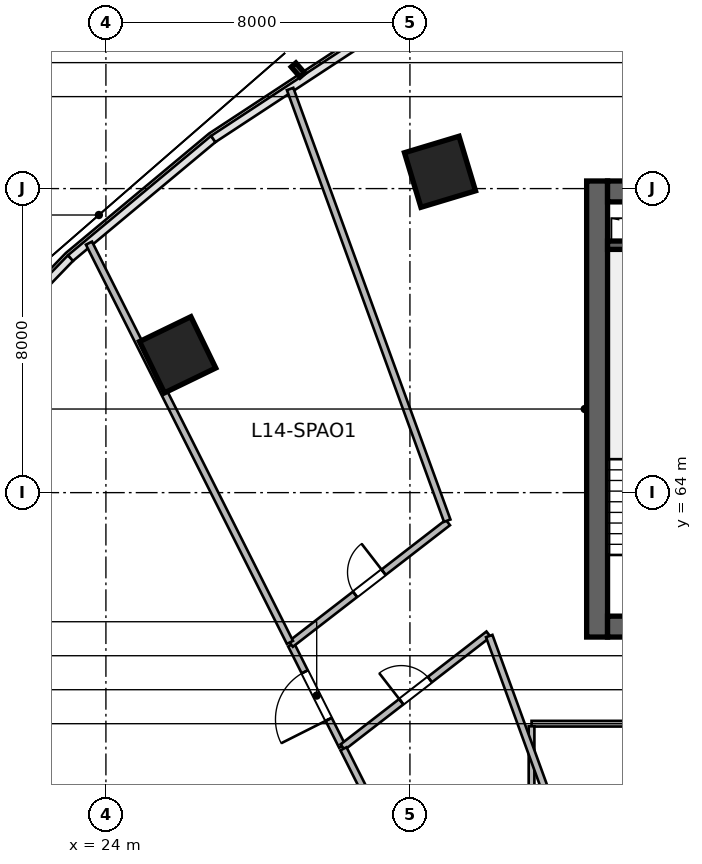
"""IFC4 building model, lengths in metres.
Left out: names, types, materials, properties, quantities, classifications, styles, units other than length and angle.
Written with IfcOpenShell. Run it as: python <this file> out.ifc"""

import sys

from ifc_helpers import new_model, si_unit, direction, frame, frame_2d, origin, origin_2d, place, context, subcontext, project, spatial, rectangle, extrude, source, transform, mapped, element, fill, save


model = new_model("IFC4")
c1 = context("Model", 3, precision=1e-05, world=origin(), true_north=direction((0.0, 1.0)))
c2 = subcontext(c1, "Body", "Model", "MODEL_VIEW")
j1 = project(units=[si_unit("LENGTHUNIT", "METRE"), si_unit("PLANEANGLEUNIT", "RADIAN")], contexts=[c1])
p1 = place(None, origin())
s1 = spatial("IfcSite", under=j1, at=p1, CompositionType="ELEMENT")
p2 = place(p1, origin())
s2 = spatial("IfcBuilding", under=s1, at=p2, CompositionType="ELEMENT")
p3 = place(p2, frame((0.0, 0.0, 64.2)))
s3 = spatial("IfcBuildingStorey", under=s2, at=p3, CompositionType="ELEMENT", Elevation=64.2)
m1 = source(origin(), c2, "Body", "SweptSolid", [
    extrude(rectangle(XDim=12.0, YDim=0.55, at=frame_2d((6.0, 0.0))), origin(), (0.0, 0.0, 1.0), 3.6),
])
p4 = place(p3, frame((36.925, 60.2, 0.0), z_axis=(0.0, 0.0, 1.0), x_axis=(0.0, 1.0, 0.0)))
e1 = element("IfcWall", 1, at=p4, inside=s3, PredefinedType="SHEAR", context=c2, shape_type="MappedRepresentation", body=[
    mapped(m1, transform((0.0, 0.0, 0.0), scale=1.0)),
])
m2 = source(origin(), c2, "Body", "SweptSolid", [
    extrude(rectangle(XDim=21.6, YDim=0.55, at=frame_2d((10.8, 0.0))), origin(), (0.0, 0.0, 1.0), 3.6),
])
p5 = place(p3, frame((37.2, 60.475, 0.0), z_axis=(0.0, 0.0, 1.0), x_axis=(1.0, 0.0, 0.0)))
e2 = element("IfcWall", 2, at=p5, inside=s3, PredefinedType="SHEAR", context=c2, shape_type="MappedRepresentation", body=[
    mapped(m2, transform((0.0, 0.0, 0.0), scale=1.0)),
])
p6 = place(p5, frame((1.1, 0.0, 0.0)))
e3 = element("IfcOpeningElement", 3, at=p6, cuts=e2, PredefinedType="OPENING", context=c2, shape_type="SweptSolid", body=[
    extrude(rectangle(XDim=1.15, YDim=2.15, at=frame_2d((0.575, 1.075))), frame((0.0, 0.285, 0.0), z_axis=(0.0, -1.0, 0.0), x_axis=(1.0, 0.0, 0.0)), (0.0, 0.0, 1.0), 0.57),
])
p7 = place(p5, frame((19.5, 0.0, 0.0)))
e4 = element("IfcOpeningElement", 4, at=p7, cuts=e2, PredefinedType="OPENING", context=c2, shape_type="SweptSolid", body=[
    extrude(rectangle(XDim=0.9, YDim=2.1, at=frame_2d((0.45, 1.05))), frame((0.0, 0.285, 0.0), z_axis=(0.0, -1.0, 0.0), x_axis=(1.0, 0.0, 0.0)), (0.0, 0.0, 1.0), 0.57),
])
p8 = place(p5, frame((12.02, 0.0, 0.0)))
e5 = element("IfcOpeningElement", 5, at=p8, cuts=e2, PredefinedType="OPENING", context=c2, shape_type="SweptSolid", body=[
    extrude(rectangle(XDim=1.6, YDim=2.15, at=frame_2d((0.8, 1.075))), frame((0.0, 0.285, 0.0), z_axis=(0.0, -1.0, 0.0), x_axis=(1.0, 0.0, 0.0)), (0.0, 0.0, 1.0), 0.57),
])
p9 = place(p3, frame((37.2, 71.925, 0.0), z_axis=(0.0, 0.0, 1.0), x_axis=(1.0, 0.0, 0.0)))
e6 = element("IfcWall", 6, at=p9, inside=s3, PredefinedType="SHEAR", context=c2, shape_type="MappedRepresentation", body=[
    mapped(m2, transform((0.0, 0.0, 0.0), scale=1.0)),
])
p10 = place(p9, frame((1.2, 0.0, 0.0)))
e7 = element("IfcOpeningElement", 7, at=p10, cuts=e6, PredefinedType="OPENING", context=c2, shape_type="SweptSolid", body=[
    extrude(rectangle(XDim=0.9, YDim=2.1, at=frame_2d((0.45, 1.05))), frame((0.0, 0.285, 0.0), z_axis=(0.0, -1.0, 0.0), x_axis=(1.0, 0.0, 0.0)), (0.0, 0.0, 1.0), 0.57),
])
p11 = place(p9, frame((14.7, 0.0, 0.0)))
e8 = element("IfcOpeningElement", 8, at=p11, cuts=e6, PredefinedType="OPENING", context=c2, shape_type="SweptSolid", body=[
    extrude(rectangle(XDim=1.2, YDim=2.15, at=frame_2d((0.6, 1.075))), frame((0.0, 0.285, 0.0), z_axis=(0.0, -1.0, 0.0), x_axis=(1.0, 0.0, 0.0)), (0.0, 0.0, 1.0), 0.57),
])
p12 = place(p9, frame((4.15, 0.0, 0.0)))
e9 = element("IfcOpeningElement", 9, at=p12, cuts=e6, PredefinedType="OPENING", context=c2, shape_type="SweptSolid", body=[
    extrude(rectangle(XDim=1.3, YDim=2.15, at=frame_2d((0.65, 1.075))), frame((0.0, 0.285, 0.0), z_axis=(0.0, -1.0, 0.0), x_axis=(1.0, 0.0, 0.0)), (0.0, 0.0, 1.0), 0.57),
])
p13 = place(p9, frame((7.1, 0.0, 0.0)))
e10 = element("IfcOpeningElement", 10, at=p13, cuts=e6, PredefinedType="OPENING", context=c2, shape_type="SweptSolid", body=[
    extrude(rectangle(XDim=0.9, YDim=2.1, at=frame_2d((0.45, 1.05))), frame((0.0, 0.285, 0.0), z_axis=(0.0, -1.0, 0.0), x_axis=(1.0, 0.0, 0.0)), (0.0, 0.0, 1.0), 0.57),
])
m3 = source(origin(), c2, "Body", "SweptSolid", [
    extrude(rectangle(XDim=3.27, YDim=0.22, at=frame_2d((1.635, 0.0))), origin(), (0.0, 0.0, 1.0), 3.6),
])
p14 = place(p3, frame((37.2, 70.51, 0.0), z_axis=(0.0, 0.0, 1.0), x_axis=(1.0, 0.0, 0.0)))
e11 = element("IfcWall", 11, at=p14, inside=s3, PredefinedType="SHEAR", context=c2, shape_type="MappedRepresentation", body=[
    mapped(m3, transform((0.0, 0.0, 0.0), scale=1.0)),
])
m4 = source(origin(), c2, "Body", "SweptSolid", [
    extrude(rectangle(XDim=1.5, YDim=1.5, at=origin_2d()), origin(), (0.0, 0.0, 1.0), 3.6),
])
for number, where, z_axis, x_axis in (
    (12, (25.888, 67.627, 0.0), (0.0, 0.0, 1.0), (-0.436, 0.9, 0.0)),
    (13, (32.791, 72.442, 0.0), (0.0, 0.0, 1.0), (-0.289, 0.957, 0.0)),
):
    element("IfcColumn", number, at=place(p3, frame(where, z_axis=z_axis, x_axis=x_axis)), inside=s3, PredefinedType="COLUMN", context=c2, shape_type="MappedRepresentation", body=[
        mapped(m4, transform((0.0, 0.0, 0.0), scale=1.0)),
    ])
m5 = source(origin(), c2, "Body", "SweptSolid", [
    extrude(rectangle(XDim=6.6, YDim=0.15, at=frame_2d((3.3, 0.0))), origin(), (0.0, 0.0, 1.0), 3.36),
])
p15 = place(p3, frame((35.2, 57.92, 0.0), z_axis=(0.0, 0.0, 1.0), x_axis=(1.0, 0.0, 0.0)))
e14 = element("IfcWall", 14, at=p15, inside=s3, PredefinedType="PARTITIONING", context=c2, shape_type="MappedRepresentation", body=[
    mapped(m5, transform((0.0, 0.0, 0.0), scale=1.0)),
])
p16 = place(p15, frame((2.85, 0.0, 0.0)))
e15 = element("IfcOpeningElement", 15, at=p16, cuts=e14, PredefinedType="OPENING", context=c2, shape_type="SweptSolid", body=[
    extrude(rectangle(XDim=0.9, YDim=2.1, at=frame_2d((0.45, 1.05))), frame((0.0, 0.085, 0.0), z_axis=(0.0, -1.0, 0.0), x_axis=(1.0, 0.0, 0.0)), (0.0, 0.0, 1.0), 0.17),
])
m6 = source(origin(), c2, "Body", "SweptSolid", [
    extrude(rectangle(XDim=3.785, YDim=0.15, at=frame_2d((1.893, 0.0))), origin(), (0.0, 0.0, 1.0), 3.36),
])
p17 = place(p3, frame((35.2, 54.067, 0.0), z_axis=(0.0, 0.0, 1.0), x_axis=(0.0, 1.0, 0.0)))
e16 = element("IfcWall", 16, at=p17, inside=s3, PredefinedType="PARTITIONING", context=c2, shape_type="MappedRepresentation", body=[
    mapped(m6, transform((0.0, 0.0, 0.0), scale=1.0)),
])
m7 = source(origin(), c2, "Body", "SweptSolid", [
    extrude(rectangle(XDim=2.985, YDim=0.18, at=frame_2d((1.493, 0.0))), origin(), (0.0, 0.0, 1.0), 3.36),
])
p18 = place(p3, frame((30.218, 57.327, 0.0), z_axis=(0.0, 0.0, 1.0), x_axis=(-0.449665526069, 0.893197018952, 0.0)))
e17 = element("IfcWall", 17, at=p18, inside=s3, PredefinedType="PLUMBINGWALL", context=c2, shape_type="MappedRepresentation", body=[
    mapped(m7, transform((0.0, 0.0, 0.0), scale=1.0)),
])
p19 = place(p18, frame((0.792, 0.0, 0.0)))
e18 = element("IfcOpeningElement", 18, at=p19, cuts=e17, PredefinedType="OPENING", context=c2, shape_type="SweptSolid", body=[
    extrude(rectangle(XDim=1.4, YDim=2.15, at=frame_2d((0.7, 1.075))), frame((0.0, 0.1, 0.0), z_axis=(0.0, -1.0, 0.0), x_axis=(1.0, 0.0, 0.0)), (0.0, 0.0, 1.0), 0.2),
])
m8 = source(origin(), c2, "Body", "SweptSolid", [
    extrude(rectangle(XDim=5.227, YDim=0.18, at=frame_2d((2.614, 0.0))), origin(), (0.0, 0.0, 1.0), 3.36),
])
p20 = place(p3, frame((28.865, 60.015, 0.0), z_axis=(0.0, 0.0, 1.0), x_axis=(0.790908912792, 0.61193389485, 0.0)))
e19 = element("IfcWall", 19, at=p20, inside=s3, PredefinedType="PLUMBINGWALL", context=c2, shape_type="MappedRepresentation", body=[
    mapped(m8, transform((0.0, 0.0, 0.0), scale=1.0)),
])
p21 = place(p20, frame((2.139, 0.0, 0.0)))
e20 = element("IfcOpeningElement", 20, at=p21, cuts=e19, PredefinedType="OPENING", context=c2, shape_type="SweptSolid", body=[
    extrude(rectangle(XDim=0.95, YDim=2.1, at=frame_2d((0.475, 1.05))), frame((0.0, 0.1, 0.0), z_axis=(0.0, -1.0, 0.0), x_axis=(1.0, 0.0, 0.0)), (0.0, 0.0, 1.0), 0.2),
])
m9 = source(origin(), c2, "Body", "SweptSolid", [
    extrude(rectangle(XDim=11.761, YDim=0.18, at=frame_2d((5.88, 0.0))), origin(), (0.0, 0.0, 1.0), 3.36),
])
p22 = place(p3, frame((28.842, 60.06, 0.0), z_axis=(0.0, 0.0, 1.0), x_axis=(-0.449611686329, 0.893224121661, 0.0)))
e21 = element("IfcWall", 21, at=p22, inside=s3, PredefinedType="PLUMBINGWALL", context=c2, shape_type="MappedRepresentation", body=[
    mapped(m9, transform((0.0, 0.0, 0.0), scale=1.0)),
])
m10 = source(origin(), c2, "Body", "SweptSolid", [
    extrude(rectangle(XDim=12.088, YDim=0.18, at=frame_2d((6.044, 0.0))), origin(), (0.0, 0.0, 1.0), 3.36),
])
p23 = place(p3, frame((32.981, 63.262, 0.0), z_axis=(0.0, 0.0, 1.0), x_axis=(-0.34203007529, 0.939689005787, 0.0)))
e22 = element("IfcWall", 22, at=p23, inside=s3, PredefinedType="PLUMBINGWALL", context=c2, shape_type="MappedRepresentation", body=[
    mapped(m10, transform((0.0, 0.0, 0.0), scale=1.0)),
])
m11 = source(origin(), c2, "Body", "SweptSolid", [
    extrude(rectangle(XDim=4.855, YDim=0.18, at=frame_2d((2.427, 0.0))), origin(), (0.0, 0.0, 1.0), 3.36),
])
p24 = place(p3, frame((30.229, 57.305, 0.0), z_axis=(0.0, 0.0, 1.0), x_axis=(0.790930965655, 0.611905391028, 0.0)))
e23 = element("IfcWall", 23, at=p24, inside=s3, PredefinedType="PLUMBINGWALL", context=c2, shape_type="MappedRepresentation", body=[
    mapped(m11, transform((0.0, 0.0, 0.0), scale=1.0)),
])
p25 = place(p24, frame((1.952, 0.0, 0.0)))
e24 = element("IfcOpeningElement", 24, at=p25, cuts=e23, PredefinedType="OPENING", context=c2, shape_type="SweptSolid", body=[
    extrude(rectangle(XDim=0.95, YDim=2.1, at=frame_2d((0.475, 1.05))), frame((0.0, 0.1, 0.0), z_axis=(0.0, -1.0, 0.0), x_axis=(1.0, 0.0, 0.0)), (0.0, 0.0, 1.0), 0.2),
])
m12 = source(origin(), c2, "Body", "SweptSolid", [
    extrude(rectangle(XDim=11.811, YDim=0.18, at=frame_2d((5.906, 0.0))), origin(), (0.0, 0.0, 1.0), 3.36),
])
p26 = place(p3, frame((35.562, 46.71, 0.0), z_axis=(0.0, 0.0, 1.0), x_axis=(-0.449626289102, 0.893216771086, 0.0)))
e25 = element("IfcWall", 25, at=p26, inside=s3, PredefinedType="PLUMBINGWALL", context=c2, shape_type="MappedRepresentation", body=[
    mapped(m12, transform((0.0, 0.0, 0.0), scale=1.0)),
])
m13 = source(origin(), c2, "Body", "SweptSolid", [
    extrude(rectangle(XDim=12.196, YDim=0.18, at=frame_2d((6.098, 0.0))), origin(), (0.0, 0.0, 1.0), 3.36),
])
p27 = place(p3, frame((38.258, 48.766, 0.0), z_axis=(0.0, 0.0, 1.0), x_axis=(-0.342022711534, 0.939691686031, 0.0)))
e26 = element("IfcWall", 26, at=p27, inside=s3, PredefinedType="PLUMBINGWALL", context=c2, shape_type="MappedRepresentation", body=[
    mapped(m13, transform((0.0, 0.0, 0.0), scale=1.0)),
])
m14 = source(origin(), c2, "Body", "SweptSolid", [
    extrude(rectangle(XDim=1.4, YDim=2.15, at=frame_2d((0.7, 1.075))), frame((0.0, 0.025, 0.0), z_axis=(0.0, -1.0, 0.0), x_axis=(1.0, 0.0, 0.0)), (0.0, 0.0, 1.0), 0.05),
])
p28 = place(p19, origin())
e27 = element("IfcDoor", 27, at=p28, inside=s3, OperationType="SINGLE_SWING_LEFT", PredefinedType="DOOR", context=c2, shape_type="MappedRepresentation", body=[
    mapped(m14, transform((0.0, 0.0, 0.0), scale=1.0)),
])
fill(e18, e27)
m15 = source(origin(), c2, "Body", "SweptSolid", [
    extrude(rectangle(XDim=0.95, YDim=2.1, at=frame_2d((0.475, 1.05))), frame((0.0, 0.025, 0.0), z_axis=(0.0, -1.0, 0.0), x_axis=(1.0, 0.0, 0.0)), (0.0, 0.0, 1.0), 0.05),
])
p29 = place(p21, origin())
e28 = element("IfcDoor", 28, at=p29, inside=s3, OperationType="SINGLE_SWING_RIGHT", PredefinedType="DOOR", context=c2, shape_type="MappedRepresentation", body=[
    mapped(m15, transform((0.0, 0.0, 0.0), scale=1.0)),
])
fill(e20, e28)
p30 = place(p25, origin())
e29 = element("IfcDoor", 29, at=p30, inside=s3, OperationType="SINGLE_SWING_LEFT", PredefinedType="DOOR", context=c2, shape_type="MappedRepresentation", body=[
    mapped(m15, transform((0.0, 0.0, 0.0), scale=1.0)),
])
fill(e24, e29)
save(model, sys.argv[1])
